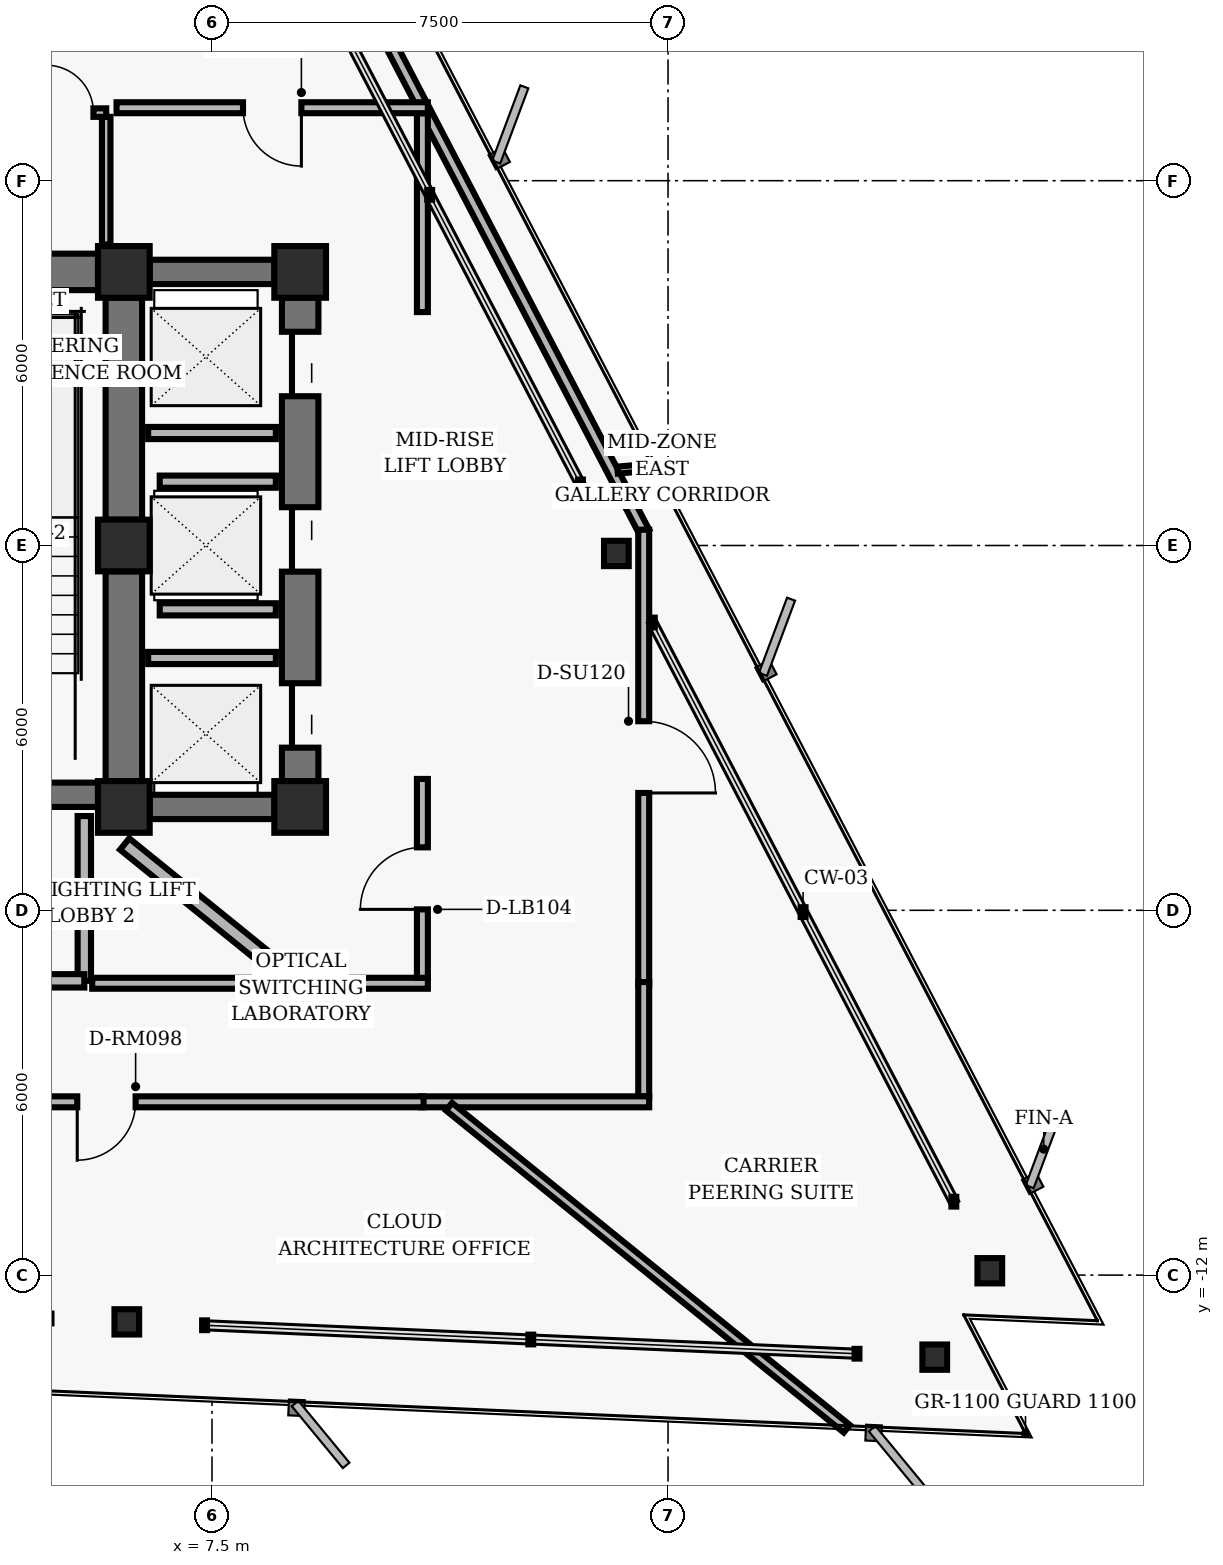
"""IFC4 building model, lengths in metres.
Left out: names, types, materials, properties, quantities, classifications, styles, units other than length and angle.
Written with IfcOpenShell. Run it as: python <this file> out.ifc"""

import sys

from ifc_helpers import new_model, si_unit, direction, frame, frame_2d, origin, origin_2d, place, context, subcontext, project, spatial, rectangle, hollow_rectangle, i_section, extrude, element, fill, save


model = new_model("IFC4")
c1 = context("Model", 3, precision=1e-05, world=origin(), true_north=direction((0.0, 1.0)))
c2 = subcontext(c1, "Body", "Model", "MODEL_VIEW")
j1 = project(units=[si_unit("LENGTHUNIT", "METRE"), si_unit("PLANEANGLEUNIT", "RADIAN")], contexts=[c1])
p1 = place(None, origin())
s1 = spatial("IfcSite", under=j1, at=p1, CompositionType="ELEMENT")
p2 = place(p1, origin())
s2 = spatial("IfcBuilding", under=s1, at=p2, CompositionType="ELEMENT")
p3 = place(p2, frame((0.0, 0.0, 128.96)))
s3 = spatial("IfcBuildingStorey", under=s2, at=p3, CompositionType="ELEMENT", Elevation=128.96)
for number, where, z_axis, x_axis in (
    (1, (6.05, 4.5, 0.0), (0.0, 0.0, 1.0), (1.0, 0.0, 0.0)),
    (2, (6.05, 0.0, 0.0), (0.0, 0.0, 1.0), (1.0, 0.0, 0.0)),
    (3, (6.05, -4.3, 0.0), (0.0, 0.0, 1.0), (1.0, 0.0, 0.0)),
    (4, (8.95, 4.5, 0.0), (0.0, 0.0, 1.0), (1.0, 0.0, 0.0)),
    (5, (8.95, -4.3, 0.0), (0.0, 0.0, 1.0), (1.0, 0.0, 0.0)),
):
    element("IfcColumn", number, at=place(p3, frame(where, z_axis=z_axis, x_axis=x_axis)), inside=s3, PredefinedType="COLUMN", context=c2, shape_type="SweptSolid", body=[
        extrude(hollow_rectangle(XDim=0.85, YDim=0.85, WallThickness=0.055, InnerFilletRadius=0.02, OuterFilletRadius=0.04, at=origin_2d()), origin(), (0.0, 0.0, 1.0), 3.04),
    ])
p4 = place(p3, frame((6.05, 0.425, 0.0), z_axis=(0.0, 0.0, 1.0), x_axis=(0.0, 1.0, 0.0)))
e6 = element("IfcWall", 6, at=p4, inside=s3, PredefinedType="SHEAR", context=c2, shape_type="SweptSolid", body=[
    extrude(rectangle(XDim=3.65, YDim=0.6, at=frame_2d((1.825, 0.0))), origin(), (0.0, 0.0, 1.0), 2.788),
])
p5 = place(p3, frame((6.05, -3.875, 0.0), z_axis=(0.0, 0.0, 1.0), x_axis=(0.0, 1.0, 0.0)))
e7 = element("IfcWall", 7, at=p5, inside=s3, PredefinedType="SHEAR", context=c2, shape_type="SweptSolid", body=[
    extrude(rectangle(XDim=3.45, YDim=0.6, at=frame_2d((1.725, 0.0))), origin(), (0.0, 0.0, 1.0), 2.788),
])
p6 = place(p3, frame((-5.625, -4.1, 0.0), z_axis=(0.0, 0.0, 1.0), x_axis=(1.0, 0.0, 0.0)))
e8 = element("IfcWall", 8, at=p6, inside=s3, PredefinedType="SHEAR", context=c2, shape_type="SweptSolid", body=[
    extrude(rectangle(XDim=11.25, YDim=0.4, at=frame_2d((5.625, 0.0))), origin(), (0.0, 0.0, 1.0), 2.788),
])
p7 = place(p6, frame((1.355, 0.0, 0.0)))
e9 = element("IfcOpeningElement", 9, at=p7, cuts=e8, PredefinedType="OPENING", context=c2, shape_type="SweptSolid", body=[
    extrude(rectangle(XDim=1.1, YDim=2.04, at=frame_2d((0.55, 1.02))), frame((0.0, 0.21, 0.0), z_axis=(0.0, -1.0, 0.0), x_axis=(1.0, 0.0, 0.0)), (0.0, 0.0, 1.0), 0.42),
])
p8 = place(p6, frame((8.795, 0.0, 0.0)))
e10 = element("IfcOpeningElement", 10, at=p8, cuts=e8, PredefinedType="OPENING", context=c2, shape_type="SweptSolid", body=[
    extrude(rectangle(XDim=1.1, YDim=2.04, at=frame_2d((0.55, 1.02))), frame((0.0, 0.21, 0.0), z_axis=(0.0, -1.0, 0.0), x_axis=(1.0, 0.0, 0.0)), (0.0, 0.0, 1.0), 0.42),
])
p9 = place(p6, frame((4.095, 0.0, 0.0)))
e11 = element("IfcOpeningElement", 11, at=p9, cuts=e8, PredefinedType="OPENING", context=c2, shape_type="SweptSolid", body=[
    extrude(rectangle(XDim=1.06, YDim=2.04, at=frame_2d((0.53, 1.02))), frame((0.0, 0.21, 0.0), z_axis=(0.0, -1.0, 0.0), x_axis=(1.0, 0.0, 0.0)), (0.0, 0.0, 1.0), 0.42),
])
p10 = place(p6, frame((6.095, 0.0, 0.0)))
e12 = element("IfcOpeningElement", 12, at=p10, cuts=e8, PredefinedType="OPENING", context=c2, shape_type="SweptSolid", body=[
    extrude(rectangle(XDim=1.06, YDim=2.04, at=frame_2d((0.53, 1.02))), frame((0.0, 0.21, 0.0), z_axis=(0.0, -1.0, 0.0), x_axis=(1.0, 0.0, 0.0)), (0.0, 0.0, 1.0), 0.42),
])
p11 = place(p3, frame((2.05, 4.5, 0.0), z_axis=(0.0, 0.0, 1.0), x_axis=(1.0, 0.0, 0.0)))
e13 = element("IfcWall", 13, at=p11, inside=s3, PredefinedType="SHEAR", context=c2, shape_type="SweptSolid", body=[
    extrude(rectangle(XDim=3.575, YDim=0.6, at=frame_2d((1.788, 0.0))), origin(), (0.0, 0.0, 1.0), 2.788),
])
p12 = place(p3, frame((8.95, -3.875, 0.0), z_axis=(0.0, 0.0, 1.0), x_axis=(0.0, 1.0, 0.0)))
e14 = element("IfcWall", 14, at=p12, inside=s3, PredefinedType="SHEAR", context=c2, shape_type="SweptSolid", body=[
    extrude(rectangle(XDim=7.95, YDim=0.6, at=frame_2d((3.975, 0.0))), origin(), (0.0, 0.0, 1.0), 2.788),
])
p13 = place(p12, frame((0.55, 0.0, 0.0)))
e15 = element("IfcOpeningElement", 15, at=p13, cuts=e14, PredefinedType="OPENING", context=c2, shape_type="SweptSolid", body=[
    extrude(rectangle(XDim=1.06, YDim=2.04, at=frame_2d((0.53, 1.02))), frame((0.0, 0.31, 0.0), z_axis=(0.0, -1.0, 0.0), x_axis=(1.0, 0.0, 0.0)), (0.0, 0.0, 1.0), 0.62),
])
p14 = place(p12, frame((3.445, 0.0, 0.0)))
e16 = element("IfcOpeningElement", 16, at=p14, cuts=e14, PredefinedType="OPENING", context=c2, shape_type="SweptSolid", body=[
    extrude(rectangle(XDim=1.06, YDim=2.04, at=frame_2d((0.53, 1.02))), frame((0.0, 0.31, 0.0), z_axis=(0.0, -1.0, 0.0), x_axis=(1.0, 0.0, 0.0)), (0.0, 0.0, 1.0), 0.62),
])
p15 = place(p12, frame((6.33, 0.0, 0.0)))
e17 = element("IfcOpeningElement", 17, at=p15, cuts=e14, PredefinedType="OPENING", context=c2, shape_type="SweptSolid", body=[
    extrude(rectangle(XDim=1.06, YDim=2.04, at=frame_2d((0.53, 1.02))), frame((0.0, 0.31, 0.0), z_axis=(0.0, -1.0, 0.0), x_axis=(1.0, 0.0, 0.0)), (0.0, 0.0, 1.0), 0.62),
])
for number, where, z_axis, x_axis in (
    (18, (6.475, 4.5, 0.0), (0.0, 0.0, 1.0), (1.0, 0.0, 0.0)),
    (19, (6.475, -4.3, 0.0), (0.0, 0.0, 1.0), (1.0, 0.0, 0.0)),
):
    element("IfcWall", number, at=place(p3, frame(where, z_axis=z_axis, x_axis=x_axis)), inside=s3, PredefinedType="SHEAR", context=c2, shape_type="SweptSolid", body=[
        extrude(rectangle(XDim=2.05, YDim=0.4, at=frame_2d((1.025, 0.0))), origin(), (0.0, 0.0, 1.0), 2.788),
    ])
for number, where, z_axis, x_axis in (
    (20, (20.292, -11.928, 0.0), (0.0, 0.0, 1.0), (1.0, 0.0, 0.0)),
    (21, (14.15, -0.131, 0.0), (0.0, 0.0, 1.0), (1.0, 0.0, 0.0)),
    (22, (6.099, -12.769, 0.0), (0.0, 0.0, 1.0), (1.0, 0.0, 0.0)),
    (23, (19.386, -13.349, 0.0), (0.0, 0.0, 1.0), (1.0, 0.0, 0.0)),
):
    element("IfcColumn", number, at=place(p3, frame(where, z_axis=z_axis, x_axis=x_axis)), inside=s3, PredefinedType="COLUMN", context=c2, shape_type="SweptSolid", body=[
        extrude(i_section(OverallWidth=0.406, OverallDepth=0.416, WebThickness=0.03, FlangeThickness=0.048, FilletRadius=0.02, at=origin_2d()), origin(), (0.0, 0.0, 1.0), 3.04),
    ])
p16 = place(p3, frame((5.4, -7.16, 0.0), z_axis=(0.0, 0.0, 1.0), x_axis=(0.0, 1.0, 0.0)))
e24 = element("IfcWall", 24, at=p16, inside=s3, PredefinedType="PARTITIONING", context=c2, shape_type="SweptSolid", body=[
    extrude(rectangle(XDim=2.71, YDim=0.22, at=frame_2d((1.355, 0.0))), origin(), (0.0, 0.0, 1.0), 2.763),
])
p17 = place(p3, frame((0.0, -7.16, 0.0), z_axis=(0.0, 0.0, 1.0), x_axis=(1.0, 0.0, 0.0)))
e25 = element("IfcWall", 25, at=p17, inside=s3, PredefinedType="PARTITIONING", context=c2, shape_type="SweptSolid", body=[
    extrude(rectangle(XDim=5.4, YDim=0.22, at=frame_2d((2.7, 0.0))), origin(), (0.0, 0.0, 1.0), 2.33),
])
p18 = place(p17, frame((2.05, 0.0, 0.0)))
e26 = element("IfcOpeningElement", 26, at=p18, cuts=e25, PredefinedType="OPENING", context=c2, shape_type="SweptSolid", body=[
    extrude(rectangle(XDim=1.12, YDim=2.02, at=frame_2d((0.56, 1.01))), frame((0.0, 0.12, 0.0), z_axis=(0.0, -1.0, 0.0), x_axis=(1.0, 0.0, 0.0)), (0.0, 0.0, 1.0), 0.24),
])
p19 = place(p3, frame((5.76, 4.95, 0.0), z_axis=(0.0, 0.0, 1.0), x_axis=(0.0, 1.0, 0.0)))
e27 = element("IfcWall", 27, at=p19, inside=s3, PredefinedType="PARTITIONING", context=c2, shape_type="SweptSolid", body=[
    extrude(rectangle(XDim=2.1, YDim=0.14, at=frame_2d((1.05, 0.0))), origin(), (0.0, 0.0, 1.0), 2.763),
])
p20 = place(p3, frame((4.56, 7.12, 0.0), z_axis=(0.0, 0.0, 1.0), x_axis=(1.0, 0.0, 0.0)))
e28 = element("IfcWall", 28, at=p20, inside=s3, PredefinedType="PARTITIONING", context=c2, shape_type="SweptSolid", body=[
    extrude(rectangle(XDim=1.2, YDim=0.14, at=frame_2d((0.6, 0.0))), origin(), (0.0, 0.0, 1.0), 2.763),
])
p21 = place(p20, frame((0.21, 0.0, 0.0)))
e29 = element("IfcOpeningElement", 29, at=p21, cuts=e28, PredefinedType="OPENING", context=c2, shape_type="SweptSolid", body=[
    extrude(rectangle(XDim=0.78, YDim=2.01, at=frame_2d((0.39, 1.005))), frame((0.0, 0.08, 0.0), z_axis=(0.0, -1.0, 0.0), x_axis=(1.0, 0.0, 0.0)), (0.0, 0.0, 1.0), 0.16),
])
for number, where, z_axis, x_axis in (
    (30, (6.45, -1.85, 0.0), (0.0, 0.0, 1.0), (1.0, 0.0, 0.0)),
    (31, (6.45, 1.85, 0.0), (0.0, 0.0, 1.0), (1.0, 0.0, 0.0)),
):
    element("IfcWall", number, at=place(p3, frame(where, z_axis=z_axis, x_axis=x_axis)), inside=s3, PredefinedType="PARTITIONING", context=c2, shape_type="SweptSolid", body=[
        extrude(rectangle(XDim=2.1, YDim=0.2, at=frame_2d((1.05, 0.0))), origin(), (0.0, 0.0, 1.0), 2.763),
    ])
for number, where, z_axis, x_axis in (
    (32, (6.64, -1.05, 0.0), (0.0, 0.0, 1.0), (1.0, 0.0, 0.0)),
    (33, (6.64, 1.05, 0.0), (0.0, 0.0, 1.0), (1.0, 0.0, 0.0)),
):
    element("IfcWall", number, at=place(p3, frame(where, z_axis=z_axis, x_axis=x_axis)), inside=s3, PredefinedType="PARTITIONING", context=c2, shape_type="SweptSolid", body=[
        extrude(rectangle(XDim=1.91, YDim=0.2, at=frame_2d((0.955, 0.0))), origin(), (0.0, 0.0, 1.0), 2.763),
    ])
p22 = place(p3, frame((10.003, 9.07, 0.0), z_axis=(0.0, 0.0, 1.0), x_axis=(0.461740291408, -0.887015165198, 0.0)))
e34 = element("IfcWall", 34, at=p22, inside=s3, PredefinedType="PARTITIONING", context=c2, shape_type="SweptSolid", body=[
    extrude(rectangle(XDim=9.976, YDim=0.18, at=frame_2d((4.988, 0.0))), origin(), (0.0, 0.0, 1.0), 2.763),
])
p23 = place(p3, frame((14.6, 0.26, 0.0), z_axis=(0.0, 0.0, 1.0), x_axis=(0.0, -1.0, 0.0)))
e35 = element("IfcWall", 35, at=p23, inside=s3, PredefinedType="PARTITIONING", context=c2, shape_type="SweptSolid", body=[
    extrude(rectangle(XDim=7.479, YDim=0.18, at=frame_2d((3.74, 0.0))), origin(), (0.0, 0.0, 1.0), 2.763),
])
p24 = place(p23, frame((3.15, 0.0, 0.0)))
e36 = element("IfcOpeningElement", 36, at=p24, cuts=e35, PredefinedType="OPENING", context=c2, shape_type="SweptSolid", body=[
    extrude(rectangle(XDim=1.18, YDim=2.02, at=frame_2d((0.59, 1.01))), frame((0.0, 0.1, 0.0), z_axis=(0.0, -1.0, 0.0), x_axis=(1.0, 0.0, 0.0)), (0.0, 0.0, 1.0), 0.2),
])
p25 = place(p3, frame((14.6, -7.18, 0.0), z_axis=(0.0, 0.0, 1.0), x_axis=(0.0, -1.0, 0.0)))
e37 = element("IfcWall", 37, at=p25, inside=s3, PredefinedType="PARTITIONING", context=c2, shape_type="SweptSolid", body=[
    extrude(rectangle(XDim=1.88, YDim=0.18, at=frame_2d((0.94, 0.0))), origin(), (0.0, 0.0, 1.0), 2.763),
])
p26 = place(p3, frame((14.69, -9.15, 0.0), z_axis=(0.0, 0.0, 1.0), x_axis=(-1.0, 0.0, 0.0)))
e38 = element("IfcWall", 38, at=p26, inside=s3, PredefinedType="PARTITIONING", context=c2, shape_type="SweptSolid", body=[
    extrude(rectangle(XDim=3.75, YDim=0.18, at=frame_2d((1.875, 0.0))), origin(), (0.0, 0.0, 1.0), 2.33),
])
p27 = place(p3, frame((10.98, -9.15, 0.0), z_axis=(0.0, 0.0, 1.0), x_axis=(-1.0, 0.0, 0.0)))
e39 = element("IfcWall", 39, at=p27, inside=s3, PredefinedType="PARTITIONING", context=c2, shape_type="SweptSolid", body=[
    extrude(rectangle(XDim=17.5, YDim=0.18, at=frame_2d((8.75, 0.0))), origin(), (0.0, 0.0, 1.0), 2.33),
])
p28 = place(p27, frame((13.116, 0.0, 0.0)))
e40 = element("IfcOpeningElement", 40, at=p28, cuts=e39, PredefinedType="OPENING", context=c2, shape_type="SweptSolid", body=[
    extrude(rectangle(XDim=1.18, YDim=2.02, at=frame_2d((0.59, 1.01))), frame((0.0, 0.1, 0.0), z_axis=(0.0, -1.0, 0.0), x_axis=(1.0, 0.0, 0.0)), (0.0, 0.0, 1.0), 0.2),
])
p29 = place(p27, frame((4.736, 0.0, 0.0)))
e41 = element("IfcOpeningElement", 41, at=p29, cuts=e39, PredefinedType="OPENING", context=c2, shape_type="SweptSolid", body=[
    extrude(rectangle(XDim=0.96, YDim=2.02, at=frame_2d((0.48, 1.01))), frame((0.0, 0.1, 0.0), z_axis=(0.0, -1.0, 0.0), x_axis=(1.0, 0.0, 0.0)), (0.0, 0.0, 1.0), 0.2),
])
p30 = place(p3, frame((5.53, -7.2, 0.0), z_axis=(0.0, 0.0, 1.0), x_axis=(1.0, 0.0, 0.0)))
e42 = element("IfcWall", 42, at=p30, inside=s3, PredefinedType="PARTITIONING", context=c2, shape_type="SweptSolid", body=[
    extrude(rectangle(XDim=5.52, YDim=0.18, at=frame_2d((2.76, 0.0))), origin(), (0.0, 0.0, 1.0), 2.33),
])
p31 = place(p3, frame((10.96, -7.11, 0.0), z_axis=(0.0, 0.0, 1.0), x_axis=(0.0, 1.0, 0.0)))
e43 = element("IfcWall", 43, at=p31, inside=s3, PredefinedType="PARTITIONING", context=c2, shape_type="SweptSolid", body=[
    extrude(rectangle(XDim=3.271, YDim=0.18, at=frame_2d((1.635, 0.0))), origin(), (0.0, 0.0, 1.0), 2.763),
])
p32 = place(p31, frame((1.125, 0.0, 0.0)))
e44 = element("IfcOpeningElement", 44, at=p32, cuts=e43, PredefinedType="OPENING", context=c2, shape_type="SweptSolid", body=[
    extrude(rectangle(XDim=1.02, YDim=2.02, at=frame_2d((0.51, 1.01))), frame((0.0, 0.1, 0.0), z_axis=(0.0, -1.0, 0.0), x_axis=(1.0, 0.0, 0.0)), (0.0, 0.0, 1.0), 0.2),
])
p33 = place(p3, frame((10.96, 3.84, 0.0), z_axis=(0.0, 0.0, 1.0), x_axis=(0.0, 1.0, 0.0)))
e45 = element("IfcWall", 45, at=p33, inside=s3, PredefinedType="PARTITIONING", context=c2, shape_type="SweptSolid", body=[
    extrude(rectangle(XDim=3.271, YDim=0.18, at=frame_2d((1.635, 0.0))), origin(), (0.0, 0.0, 1.0), 2.763),
])
p34 = place(p3, frame((11.05, 7.2, 0.0), z_axis=(0.0, 0.0, 1.0), x_axis=(-1.0, 0.0, 0.0)))
e46 = element("IfcWall", 46, at=p34, inside=s3, PredefinedType="PARTITIONING", context=c2, shape_type="SweptSolid", body=[
    extrude(rectangle(XDim=5.12, YDim=0.18, at=frame_2d((2.56, 0.0))), origin(), (0.0, 0.0, 1.0), 2.763),
])
p35 = place(p34, frame((2.08, 0.0, 0.0)))
e47 = element("IfcOpeningElement", 47, at=p35, cuts=e46, PredefinedType="OPENING", context=c2, shape_type="SweptSolid", body=[
    extrude(rectangle(XDim=0.96, YDim=2.02, at=frame_2d((0.48, 1.01))), frame((0.0, 0.1, 0.0), z_axis=(0.0, -1.0, 0.0), x_axis=(1.0, 0.0, 0.0)), (0.0, 0.0, 1.0), 0.2),
])
p36 = place(p3, frame((6.063, -4.91, 0.0), z_axis=(0.0, 0.0, 1.0), x_axis=(0.777131535724, -0.629338204929, 0.0)))
e48 = element("IfcWall", 48, at=p36, inside=s3, PredefinedType="PARTITIONING", context=c2, shape_type="SweptSolid", body=[
    extrude(rectangle(XDim=3.512, YDim=0.24, at=frame_2d((1.756, 0.0))), origin(), (0.0, 0.0, 1.0), 2.763),
])
p37 = place(p3, frame((11.398, -9.23, 0.0), z_axis=(0.0, 0.0, 1.0), x_axis=(0.777150974354, -0.629314200588, 0.0)))
e49 = element("IfcWall", 49, at=p37, inside=s3, PredefinedType="PARTITIONING", context=c2, shape_type="SweptSolid", body=[
    extrude(rectangle(XDim=8.417, YDim=0.16, at=frame_2d((4.208, 0.0))), origin(), (0.0, 0.0, 1.0), 2.763),
])
p38 = place(p3, frame((14.169, 1.24, 0.0), z_axis=(0.0, 0.0, 1.0), x_axis=(0.996194547312, 0.08715746615, 0.0)))
e50 = element("IfcWall", 50, at=p38, inside=s3, PredefinedType="MOVABLE", context=c2, shape_type="SweptSolid", body=[
    extrude(rectangle(XDim=0.639, YDim=0.115, at=frame_2d((0.319, 0.0))), origin(), (0.0, 0.0, 1.0), 2.763),
])
p39 = place(p21, origin())
e51 = element("IfcDoor", 51, at=p39, inside=s3, OperationType="SINGLE_SWING_LEFT", PredefinedType="DOOR", context=c2, shape_type="SweptSolid", body=[
    extrude(rectangle(XDim=0.78, YDim=2.01, at=frame_2d((0.39, 1.005))), frame((0.0, 0.025, 0.0), z_axis=(0.0, -1.0, 0.0), x_axis=(1.0, 0.0, 0.0)), (0.0, 0.0, 1.0), 0.05),
])
fill(e29, e51)
p40 = place(p13, origin())
e52 = element("IfcDoor", 52, at=p40, inside=s3, OperationType="SLIDING_TO_LEFT", PredefinedType="DOOR", context=c2, shape_type="SweptSolid", body=[
    extrude(rectangle(XDim=1.06, YDim=2.04, at=frame_2d((0.53, 1.02))), frame((0.0, 0.025, 0.0), z_axis=(0.0, -1.0, 0.0), x_axis=(1.0, 0.0, 0.0)), (0.0, 0.0, 1.0), 0.05),
])
fill(e15, e52)
p41 = place(p14, origin())
e53 = element("IfcDoor", 53, at=p41, inside=s3, OperationType="SLIDING_TO_RIGHT", PredefinedType="DOOR", context=c2, shape_type="SweptSolid", body=[
    extrude(rectangle(XDim=1.06, YDim=2.04, at=frame_2d((0.53, 1.02))), frame((0.0, 0.025, 0.0), z_axis=(0.0, -1.0, 0.0), x_axis=(1.0, 0.0, 0.0)), (0.0, 0.0, 1.0), 0.05),
])
fill(e16, e53)
p42 = place(p15, origin())
e54 = element("IfcDoor", 54, at=p42, inside=s3, OperationType="SLIDING_TO_LEFT", PredefinedType="DOOR", context=c2, shape_type="SweptSolid", body=[
    extrude(rectangle(XDim=1.06, YDim=2.04, at=frame_2d((0.53, 1.02))), frame((0.0, 0.025, 0.0), z_axis=(0.0, -1.0, 0.0), x_axis=(1.0, 0.0, 0.0)), (0.0, 0.0, 1.0), 0.05),
])
fill(e17, e54)
p43 = place(p29, origin())
e55 = element("IfcDoor", 55, at=p43, inside=s3, OperationType="SINGLE_SWING_RIGHT", PredefinedType="DOOR", context=c2, shape_type="SweptSolid", body=[
    extrude(rectangle(XDim=0.96, YDim=2.02, at=frame_2d((0.48, 1.01))), frame((0.0, 0.025, 0.0), z_axis=(0.0, -1.0, 0.0), x_axis=(1.0, 0.0, 0.0)), (0.0, 0.0, 1.0), 0.05),
])
fill(e41, e55)
p44 = place(p32, origin())
e56 = element("IfcDoor", 56, at=p44, inside=s3, OperationType="SINGLE_SWING_LEFT", PredefinedType="DOOR", context=c2, shape_type="SweptSolid", body=[
    extrude(rectangle(XDim=1.02, YDim=2.02, at=frame_2d((0.51, 1.01))), frame((0.0, 0.025, 0.0), z_axis=(0.0, -1.0, 0.0), x_axis=(1.0, 0.0, 0.0)), (0.0, 0.0, 1.0), 0.05),
])
fill(e44, e56)
p45 = place(p24, origin())
e57 = element("IfcDoor", 57, at=p45, inside=s3, OperationType="SINGLE_SWING_RIGHT", PredefinedType="DOOR", context=c2, shape_type="SweptSolid", body=[
    extrude(rectangle(XDim=1.18, YDim=2.02, at=frame_2d((0.59, 1.01))), frame((0.0, 0.025, 0.0), z_axis=(0.0, -1.0, 0.0), x_axis=(1.0, 0.0, 0.0)), (0.0, 0.0, 1.0), 0.05),
])
fill(e36, e57)
p46 = place(p35, origin())
e58 = element("IfcDoor", 58, at=p46, inside=s3, OperationType="SINGLE_SWING_LEFT", PredefinedType="DOOR", context=c2, shape_type="SweptSolid", body=[
    extrude(rectangle(XDim=0.96, YDim=2.02, at=frame_2d((0.48, 1.01))), frame((0.0, 0.025, 0.0), z_axis=(0.0, -1.0, 0.0), x_axis=(1.0, 0.0, 0.0)), (0.0, 0.0, 1.0), 0.05),
])
fill(e47, e58)
save(model, sys.argv[1])
